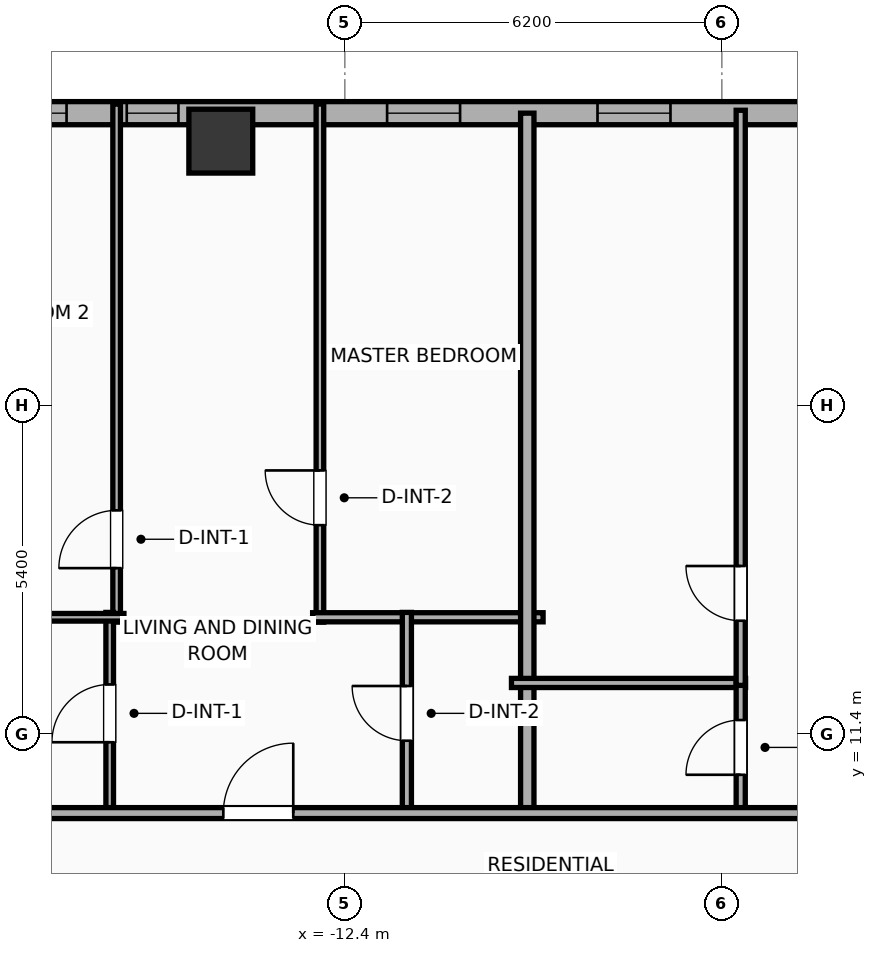
"""IFC4 building model, lengths in metres.
Left out: names, types, materials, properties, quantities, classifications, styles, units other than length and angle.
Written with IfcOpenShell. Run it as: python <this file> out.ifc"""

import sys

from ifc_helpers import new_model, si_unit, direction, frame, frame_2d, origin, origin_2d, place, context, subcontext, project, spatial, rectangle, hollow_rectangle, extrude, element, fill, save


model = new_model("IFC4")
c1 = context("Model", 3, precision=1e-05, world=origin(), true_north=direction((0.0, 1.0)))
c2 = subcontext(c1, "Body", "Model", "MODEL_VIEW")
j1 = project(units=[si_unit("LENGTHUNIT", "METRE"), si_unit("PLANEANGLEUNIT", "RADIAN")], contexts=[c1])
p1 = place(None, origin())
s1 = spatial("IfcSite", under=j1, at=p1, CompositionType="ELEMENT")
p2 = place(p1, origin())
s2 = spatial("IfcBuilding", under=s1, at=p2, CompositionType="ELEMENT")
p3 = place(p2, frame((0.0, 0.0, 105.3)))
s3 = spatial("IfcBuildingStorey", under=s2, at=p3, CompositionType="ELEMENT", Elevation=105.3)
p4 = place(p3, frame((-14.44, 21.15, 0.0), z_axis=(0.0, 0.0, 1.0), x_axis=(1.0, 0.0, 0.0)))
e1 = element("IfcColumn", 1, at=p4, inside=s3, PredefinedType="COLUMN", context=c2, shape_type="SweptSolid", body=[
    extrude(hollow_rectangle(XDim=1.05, YDim=1.05, WallThickness=0.036, at=origin_2d()), origin(), (0.0, 0.0, 1.0), 3.9),
])
p5 = place(p3, frame((-25.381, 21.61, 0.0), z_axis=(0.0, 0.0, 1.0), x_axis=(1.0, 0.0, 0.0)))
e2 = element("IfcWall", 2, at=p5, inside=s3, PredefinedType="ELEMENTEDWALL", context=c2, shape_type="SweptSolid", body=[
    extrude(rectangle(XDim=54.763, YDim=0.38, at=frame_2d((27.381, 0.0))), origin(), (0.0, 0.0, 1.0), 3.65),
])
p6 = place(p5, frame((45.067, 0.0, 0.75)))
e3 = element("IfcOpeningElement", 3, at=p6, cuts=e2, PredefinedType="OPENING", context=c2, shape_type="SweptSolid", body=[
    extrude(rectangle(XDim=2.4, YDim=2.1, at=frame_2d((1.2, 1.05))), frame((0.0, 0.2, 0.0), z_axis=(0.0, -1.0, 0.0), x_axis=(1.0, 0.0, 0.0)), (0.0, 0.0, 1.0), 0.4),
])
p7 = place(p5, frame((4.076, 0.0, 0.75)))
e4 = element("IfcOpeningElement", 4, at=p7, cuts=e2, PredefinedType="OPENING", context=c2, shape_type="SweptSolid", body=[
    extrude(rectangle(XDim=1.2, YDim=2.05, at=frame_2d((0.6, 1.025))), frame((0.0, 0.2, 0.0), z_axis=(0.0, -1.0, 0.0), x_axis=(1.0, 0.0, 0.0)), (0.0, 0.0, 1.0), 0.4),
])
p8 = place(p5, frame((9.395, 0.0, 0.75)))
e5 = element("IfcOpeningElement", 5, at=p8, cuts=e2, PredefinedType="OPENING", context=c2, shape_type="SweptSolid", body=[
    extrude(rectangle(XDim=0.85, YDim=2.05, at=frame_2d((0.425, 1.025))), frame((0.0, 0.2, 0.0), z_axis=(0.0, -1.0, 0.0), x_axis=(1.0, 0.0, 0.0)), (0.0, 0.0, 1.0), 0.4),
])
p9 = place(p5, frame((7.205, 0.0, 0.75)))
e6 = element("IfcOpeningElement", 6, at=p9, cuts=e2, PredefinedType="OPENING", context=c2, shape_type="SweptSolid", body=[
    extrude(rectangle(XDim=1.2, YDim=2.05, at=frame_2d((0.6, 1.025))), frame((0.0, 0.2, 0.0), z_axis=(0.0, -1.0, 0.0), x_axis=(1.0, 0.0, 0.0)), (0.0, 0.0, 1.0), 0.4),
])
p10 = place(p5, frame((13.676, 0.0, 0.75)))
e7 = element("IfcOpeningElement", 7, at=p10, cuts=e2, PredefinedType="OPENING", context=c2, shape_type="SweptSolid", body=[
    extrude(rectangle(XDim=1.2, YDim=2.05, at=frame_2d((0.6, 1.025))), frame((0.0, 0.2, 0.0), z_axis=(0.0, -1.0, 0.0), x_axis=(1.0, 0.0, 0.0)), (0.0, 0.0, 1.0), 0.4),
])
p11 = place(p5, frame((17.136, 0.0, 0.75)))
e8 = element("IfcOpeningElement", 8, at=p11, cuts=e2, PredefinedType="OPENING", context=c2, shape_type="SweptSolid", body=[
    extrude(rectangle(XDim=1.2, YDim=2.05, at=frame_2d((0.6, 1.025))), frame((0.0, 0.2, 0.0), z_axis=(0.0, -1.0, 0.0), x_axis=(1.0, 0.0, 0.0)), (0.0, 0.0, 1.0), 0.4),
])
p12 = place(p5, frame((22.656, 0.0, 0.75)))
e9 = element("IfcOpeningElement", 9, at=p12, cuts=e2, PredefinedType="OPENING", context=c2, shape_type="SweptSolid", body=[
    extrude(rectangle(XDim=1.2, YDim=2.05, at=frame_2d((0.6, 1.025))), frame((0.0, 0.2, 0.0), z_axis=(0.0, -1.0, 0.0), x_axis=(1.0, 0.0, 0.0)), (0.0, 0.0, 1.0), 0.4),
])
p13 = place(p5, frame((29.443, 0.0, 0.75)))
e10 = element("IfcOpeningElement", 10, at=p13, cuts=e2, PredefinedType="OPENING", context=c2, shape_type="SweptSolid", body=[
    extrude(rectangle(XDim=1.2, YDim=2.05, at=frame_2d((0.6, 1.025))), frame((0.0, 0.2, 0.0), z_axis=(0.0, -1.0, 0.0), x_axis=(1.0, 0.0, 0.0)), (0.0, 0.0, 1.0), 0.4),
])
p14 = place(p5, frame((26.348, 0.0, 0.75)))
e11 = element("IfcOpeningElement", 11, at=p14, cuts=e2, PredefinedType="OPENING", context=c2, shape_type="SweptSolid", body=[
    extrude(rectangle(XDim=1.2, YDim=2.05, at=frame_2d((0.6, 1.025))), frame((0.0, 0.2, 0.0), z_axis=(0.0, -1.0, 0.0), x_axis=(1.0, 0.0, 0.0)), (0.0, 0.0, 1.0), 0.4),
])
p15 = place(p5, frame((33.596, 0.0, 0.75)))
e12 = element("IfcOpeningElement", 12, at=p15, cuts=e2, PredefinedType="OPENING", context=c2, shape_type="SweptSolid", body=[
    extrude(rectangle(XDim=1.2, YDim=2.05, at=frame_2d((0.6, 1.025))), frame((0.0, 0.2, 0.0), z_axis=(0.0, -1.0, 0.0), x_axis=(1.0, 0.0, 0.0)), (0.0, 0.0, 1.0), 0.4),
])
p16 = place(p5, frame((36.014, 0.0, 0.75)))
e13 = element("IfcOpeningElement", 13, at=p16, cuts=e2, PredefinedType="OPENING", context=c2, shape_type="SweptSolid", body=[
    extrude(rectangle(XDim=1.2, YDim=2.05, at=frame_2d((0.6, 1.025))), frame((0.0, 0.2, 0.0), z_axis=(0.0, -1.0, 0.0), x_axis=(1.0, 0.0, 0.0)), (0.0, 0.0, 1.0), 0.4),
])
p17 = place(p5, frame((40.814, 0.0, 0.75)))
e14 = element("IfcOpeningElement", 14, at=p17, cuts=e2, PredefinedType="OPENING", context=c2, shape_type="SweptSolid", body=[
    extrude(rectangle(XDim=1.2, YDim=2.05, at=frame_2d((0.6, 1.025))), frame((0.0, 0.2, 0.0), z_axis=(0.0, -1.0, 0.0), x_axis=(1.0, 0.0, 0.0)), (0.0, 0.0, 1.0), 0.4),
])
p18 = place(p5, frame((49.385, 0.0, 0.75)))
e15 = element("IfcOpeningElement", 15, at=p18, cuts=e2, PredefinedType="OPENING", context=c2, shape_type="SweptSolid", body=[
    extrude(rectangle(XDim=1.2, YDim=2.05, at=frame_2d((0.6, 1.025))), frame((0.0, 0.2, 0.0), z_axis=(0.0, -1.0, 0.0), x_axis=(1.0, 0.0, 0.0)), (0.0, 0.0, 1.0), 0.4),
])
p19 = place(p5, frame((52.181, 0.0, 0.75)))
e16 = element("IfcOpeningElement", 16, at=p19, cuts=e2, PredefinedType="OPENING", context=c2, shape_type="SweptSolid", body=[
    extrude(rectangle(XDim=1.2, YDim=2.05, at=frame_2d((0.6, 1.025))), frame((0.0, 0.2, 0.0), z_axis=(0.0, -1.0, 0.0), x_axis=(1.0, 0.0, 0.0)), (0.0, 0.0, 1.0), 0.4),
])
p20 = place(p3, frame((-16.153, 13.24, 0.0), z_axis=(0.0, 0.0, 1.0), x_axis=(0.0, 1.0, 0.0)))
e17 = element("IfcWall", 17, at=p20, inside=s3, PredefinedType="PARTITIONING", context=c2, shape_type="SweptSolid", body=[
    extrude(rectangle(XDim=8.52, YDim=0.125, at=frame_2d((4.26, 0.0))), origin(), (0.0, 0.0, 1.0), 3.65),
])
p21 = place(p20, frame((0.888, 0.0, 0.0)))
e18 = element("IfcOpeningElement", 18, at=p21, cuts=e17, PredefinedType="OPENING", context=c2, shape_type="SweptSolid", body=[
    extrude(rectangle(XDim=0.95, YDim=2.05, at=frame_2d((0.475, 1.025))), frame((0.0, 0.073, 0.0), z_axis=(0.0, -1.0, 0.0), x_axis=(1.0, 0.0, 0.0)), (0.0, 0.0, 1.0), 0.145),
])
p22 = place(p3, frame((-12.81, 13.24, 0.0), z_axis=(0.0, 0.0, 1.0), x_axis=(0.0, 1.0, 0.0)))
e19 = element("IfcWall", 19, at=p22, inside=s3, PredefinedType="PARTITIONING", context=c2, shape_type="SweptSolid", body=[
    extrude(rectangle(XDim=8.52, YDim=0.125, at=frame_2d((4.26, 0.0))), origin(), (0.0, 0.0, 1.0), 3.65),
])
p23 = place(p22, frame((1.595, 0.0, 0.0)))
e20 = element("IfcOpeningElement", 20, at=p23, cuts=e19, PredefinedType="OPENING", context=c2, shape_type="SweptSolid", body=[
    extrude(rectangle(XDim=0.9, YDim=2.05, at=frame_2d((0.45, 1.025))), frame((0.0, 0.073, 0.0), z_axis=(0.0, -1.0, 0.0), x_axis=(1.0, 0.0, 0.0)), (0.0, 0.0, 1.0), 0.145),
])
p24 = place(p3, frame((-12.93, 13.32, 0.0), z_axis=(0.0, 0.0, 1.0), x_axis=(1.0, 0.0, 0.0)))
e21 = element("IfcWall", 21, at=p24, inside=s3, PredefinedType="PLUMBINGWALL", context=c2, shape_type="SweptSolid", body=[
    extrude(rectangle(XDim=3.79, YDim=0.15, at=frame_2d((1.895, 0.0))), origin(), (0.0, 0.0, 1.0), 3.65),
])
p25 = place(p3, frame((-16.267, 10.08, 0.0), z_axis=(0.0, 0.0, 1.0), x_axis=(0.0, 1.0, 0.0)))
e22 = element("IfcWall", 22, at=p25, inside=s3, PredefinedType="PARTITIONING", context=c2, shape_type="SweptSolid", body=[
    extrude(rectangle(XDim=3.32, YDim=0.125, at=frame_2d((1.66, 0.0))), origin(), (0.0, 0.0, 1.0), 3.65),
])
p26 = place(p25, frame((1.185, 0.0, 0.0)))
e23 = element("IfcOpeningElement", 23, at=p26, cuts=e22, PredefinedType="OPENING", context=c2, shape_type="SweptSolid", body=[
    extrude(rectangle(XDim=0.95, YDim=2.05, at=frame_2d((0.475, 1.025))), frame((0.0, 0.073, 0.0), z_axis=(0.0, -1.0, 0.0), x_axis=(1.0, 0.0, 0.0)), (0.0, 0.0, 1.0), 0.145),
])
p27 = place(p3, frame((-19.075, 13.32, 0.0), z_axis=(0.0, 0.0, 1.0), x_axis=(1.0, 0.0, 0.0)))
e24 = element("IfcWall", 24, at=p27, inside=s3, PredefinedType="PARTITIONING", context=c2, shape_type="SweptSolid", body=[
    extrude(rectangle(XDim=3.042, YDim=0.125, at=frame_2d((1.521, 0.0))), origin(), (0.0, 0.0, 1.0), 3.65),
])
p28 = place(p3, frame((-11.38, 10.08, 0.0), z_axis=(0.0, 0.0, 1.0), x_axis=(0.0, 1.0, 0.0)))
e25 = element("IfcWall", 25, at=p28, inside=s3, PredefinedType="PLUMBINGWALL", context=c2, shape_type="SweptSolid", body=[
    extrude(rectangle(XDim=3.32, YDim=0.15, at=frame_2d((1.66, 0.0))), origin(), (0.0, 0.0, 1.0), 3.65),
])
p29 = place(p28, frame((1.21, 0.0, 0.0)))
e26 = element("IfcOpeningElement", 26, at=p29, cuts=e25, PredefinedType="OPENING", context=c2, shape_type="SweptSolid", body=[
    extrude(rectangle(XDim=0.9, YDim=2.05, at=frame_2d((0.45, 1.025))), frame((0.0, 0.085, 0.0), z_axis=(0.0, -1.0, 0.0), x_axis=(1.0, 0.0, 0.0)), (0.0, 0.0, 1.0), 0.17),
])
p30 = place(p3, frame((-9.4, 10.02, 0.0), z_axis=(0.0, 0.0, 1.0), x_axis=(0.0, 1.0, 0.0)))
e27 = element("IfcWall", 27, at=p30, inside=s3, PredefinedType="PARTITIONING", context=c2, shape_type="SweptSolid", body=[
    extrude(rectangle(XDim=11.59, YDim=0.22, at=frame_2d((5.795, 0.0))), origin(), (0.0, 0.0, 1.0), 3.65),
])
p31 = place(p3, frame((-9.66, 12.24, 0.0), z_axis=(0.0, 0.0, 1.0), x_axis=(1.0, 0.0, 0.0)))
e28 = element("IfcWall", 28, at=p31, inside=s3, PredefinedType="PLUMBINGWALL", context=c2, shape_type="SweptSolid", body=[
    extrude(rectangle(XDim=3.85, YDim=0.15, at=frame_2d((1.925, 0.0))), origin(), (0.0, 0.0, 1.0), 3.65),
])
p32 = place(p3, frame((-5.89, 10.08, 0.0), z_axis=(0.0, 0.0, 1.0), x_axis=(0.0, 1.0, 0.0)))
e29 = element("IfcWall", 29, at=p32, inside=s3, PredefinedType="PLUMBINGWALL", context=c2, shape_type="SweptSolid", body=[
    extrude(rectangle(XDim=2.2, YDim=0.15, at=frame_2d((1.1, 0.0))), origin(), (0.0, 0.0, 1.0), 3.65),
])
p33 = place(p32, frame((0.65, 0.0, 0.0)))
e30 = element("IfcOpeningElement", 30, at=p33, cuts=e29, PredefinedType="OPENING", context=c2, shape_type="SweptSolid", body=[
    extrude(rectangle(XDim=0.9, YDim=2.05, at=frame_2d((0.45, 1.025))), frame((0.0, 0.085, 0.0), z_axis=(0.0, -1.0, 0.0), x_axis=(1.0, 0.0, 0.0)), (0.0, 0.0, 1.0), 0.17),
])
p34 = place(p3, frame((-5.89, 12.2, 0.0), z_axis=(0.0, 0.0, 1.0), x_axis=(0.0, 1.0, 0.0)))
e31 = element("IfcWall", 31, at=p34, inside=s3, PredefinedType="PLUMBINGWALL", context=c2, shape_type="SweptSolid", body=[
    extrude(rectangle(XDim=9.458, YDim=0.15, at=frame_2d((4.729, 0.0))), origin(), (0.0, 0.0, 1.0), 3.65),
])
p35 = place(p34, frame((1.063, 0.0, 0.0)))
e32 = element("IfcOpeningElement", 32, at=p35, cuts=e31, PredefinedType="OPENING", context=c2, shape_type="SweptSolid", body=[
    extrude(rectangle(XDim=0.9, YDim=2.05, at=frame_2d((0.45, 1.025))), frame((0.0, 0.085, 0.0), z_axis=(0.0, -1.0, 0.0), x_axis=(1.0, 0.0, 0.0)), (0.0, 0.0, 1.0), 0.17),
])
p36 = place(p3, frame((-29.21, 10.1, 0.0), z_axis=(0.0, 0.0, 1.0), x_axis=(1.0, 0.0, 0.0)))
e33 = element("IfcWall", 33, at=p36, inside=s3, PredefinedType="PARTITIONING", context=c2, shape_type="SweptSolid", body=[
    extrude(rectangle(XDim=62.42, YDim=0.18, at=frame_2d((31.21, 0.0))), origin(), (0.0, 0.0, 1.0), 3.65),
])
p37 = place(p36, frame((4.906, 0.0, 0.0)))
e34 = element("IfcOpeningElement", 34, at=p37, cuts=e33, PredefinedType="OPENING", context=c2, shape_type="SweptSolid", body=[
    extrude(rectangle(XDim=1.15, YDim=2.05, at=frame_2d((0.575, 1.025))), frame((0.0, 0.1, 0.0), z_axis=(0.0, -1.0, 0.0), x_axis=(1.0, 0.0, 0.0)), (0.0, 0.0, 1.0), 0.2),
])
p38 = place(p36, frame((14.812, 0.0, 0.0)))
e35 = element("IfcOpeningElement", 35, at=p38, cuts=e33, PredefinedType="OPENING", context=c2, shape_type="SweptSolid", body=[
    extrude(rectangle(XDim=1.15, YDim=2.05, at=frame_2d((0.575, 1.025))), frame((0.0, 0.1, 0.0), z_axis=(0.0, -1.0, 0.0), x_axis=(1.0, 0.0, 0.0)), (0.0, 0.0, 1.0), 0.2),
])
p39 = place(p36, frame((24.406, 0.0, 0.0)))
e36 = element("IfcOpeningElement", 36, at=p39, cuts=e33, PredefinedType="OPENING", context=c2, shape_type="SweptSolid", body=[
    extrude(rectangle(XDim=1.15, YDim=2.05, at=frame_2d((0.575, 1.025))), frame((0.0, 0.1, 0.0), z_axis=(0.0, -1.0, 0.0), x_axis=(1.0, 0.0, 0.0)), (0.0, 0.0, 1.0), 0.2),
])
p40 = place(p36, frame((33.981, 0.0, 0.0)))
e37 = element("IfcOpeningElement", 37, at=p40, cuts=e33, PredefinedType="OPENING", context=c2, shape_type="SweptSolid", body=[
    extrude(rectangle(XDim=1.15, YDim=2.05, at=frame_2d((0.575, 1.025))), frame((0.0, 0.1, 0.0), z_axis=(0.0, -1.0, 0.0), x_axis=(1.0, 0.0, 0.0)), (0.0, 0.0, 1.0), 0.2),
])
p41 = place(p36, frame((43.138, 0.0, 0.0)))
e38 = element("IfcOpeningElement", 38, at=p41, cuts=e33, PredefinedType="OPENING", context=c2, shape_type="SweptSolid", body=[
    extrude(rectangle(XDim=1.15, YDim=2.05, at=frame_2d((0.575, 1.025))), frame((0.0, 0.1, 0.0), z_axis=(0.0, -1.0, 0.0), x_axis=(1.0, 0.0, 0.0)), (0.0, 0.0, 1.0), 0.2),
])
p42 = place(p36, frame((51.777, 0.0, 0.0)))
e39 = element("IfcOpeningElement", 39, at=p42, cuts=e33, PredefinedType="OPENING", context=c2, shape_type="SweptSolid", body=[
    extrude(rectangle(XDim=0.9, YDim=2.05, at=frame_2d((0.45, 1.025))), frame((0.0, 0.1, 0.0), z_axis=(0.0, -1.0, 0.0), x_axis=(1.0, 0.0, 0.0)), (0.0, 0.0, 1.0), 0.2),
])
p43 = place(p36, frame((58.718, 0.0, 0.0)))
e40 = element("IfcOpeningElement", 40, at=p43, cuts=e33, PredefinedType="OPENING", context=c2, shape_type="SweptSolid", body=[
    extrude(rectangle(XDim=0.9, YDim=2.05, at=frame_2d((0.45, 1.025))), frame((0.0, 0.1, 0.0), z_axis=(0.0, -1.0, 0.0), x_axis=(1.0, 0.0, 0.0)), (0.0, 0.0, 1.0), 0.2),
])
p44 = place(p8, origin())
e41 = element("IfcWindow", 41, at=p44, inside=s3, PartitioningType="SINGLE_PANEL", PredefinedType="WINDOW", context=c2, shape_type="SweptSolid", body=[
    extrude(rectangle(XDim=0.85, YDim=2.05, at=frame_2d((0.425, 1.025))), frame((0.0, 0.03, 0.0), z_axis=(0.0, -1.0, 0.0), x_axis=(1.0, 0.0, 0.0)), (0.0, 0.0, 1.0), 0.06),
])
fill(e5, e41)
p45 = place(p9, origin())
e42 = element("IfcWindow", 42, at=p45, inside=s3, PartitioningType="SINGLE_PANEL", PredefinedType="WINDOW", context=c2, shape_type="SweptSolid", body=[
    extrude(rectangle(XDim=1.2, YDim=2.05, at=frame_2d((0.6, 1.025))), frame((0.0, 0.03, 0.0), z_axis=(0.0, -1.0, 0.0), x_axis=(1.0, 0.0, 0.0)), (0.0, 0.0, 1.0), 0.06),
])
fill(e6, e42)
p46 = place(p10, origin())
e43 = element("IfcWindow", 43, at=p46, inside=s3, PartitioningType="SINGLE_PANEL", PredefinedType="WINDOW", context=c2, shape_type="SweptSolid", body=[
    extrude(rectangle(XDim=1.2, YDim=2.05, at=frame_2d((0.6, 1.025))), frame((0.0, 0.03, 0.0), z_axis=(0.0, -1.0, 0.0), x_axis=(1.0, 0.0, 0.0)), (0.0, 0.0, 1.0), 0.06),
])
fill(e7, e43)
p47 = place(p11, origin())
e44 = element("IfcWindow", 44, at=p47, inside=s3, PartitioningType="SINGLE_PANEL", PredefinedType="WINDOW", context=c2, shape_type="SweptSolid", body=[
    extrude(rectangle(XDim=1.2, YDim=2.05, at=frame_2d((0.6, 1.025))), frame((0.0, 0.03, 0.0), z_axis=(0.0, -1.0, 0.0), x_axis=(1.0, 0.0, 0.0)), (0.0, 0.0, 1.0), 0.06),
])
fill(e8, e44)
p48 = place(p21, origin())
e45 = element("IfcDoor", 45, at=p48, inside=s3, OperationType="SINGLE_SWING_LEFT", PredefinedType="DOOR", context=c2, shape_type="SweptSolid", body=[
    extrude(rectangle(XDim=0.95, YDim=2.05, at=frame_2d((0.475, 1.025))), frame((0.0, 0.025, 0.0), z_axis=(0.0, -1.0, 0.0), x_axis=(1.0, 0.0, 0.0)), (0.0, 0.0, 1.0), 0.05),
])
fill(e18, e45)
p49 = place(p23, origin())
e46 = element("IfcDoor", 46, at=p49, inside=s3, OperationType="SINGLE_SWING_RIGHT", PredefinedType="DOOR", context=c2, shape_type="SweptSolid", body=[
    extrude(rectangle(XDim=0.9, YDim=2.05, at=frame_2d((0.45, 1.025))), frame((0.0, 0.025, 0.0), z_axis=(0.0, -1.0, 0.0), x_axis=(1.0, 0.0, 0.0)), (0.0, 0.0, 1.0), 0.05),
])
fill(e20, e46)
p50 = place(p26, origin())
e47 = element("IfcDoor", 47, at=p50, inside=s3, OperationType="SINGLE_SWING_LEFT", PredefinedType="DOOR", context=c2, shape_type="SweptSolid", body=[
    extrude(rectangle(XDim=0.95, YDim=2.05, at=frame_2d((0.475, 1.025))), frame((0.0, 0.025, 0.0), z_axis=(0.0, -1.0, 0.0), x_axis=(1.0, 0.0, 0.0)), (0.0, 0.0, 1.0), 0.05),
])
fill(e23, e47)
p51 = place(p29, origin())
e48 = element("IfcDoor", 48, at=p51, inside=s3, OperationType="SINGLE_SWING_RIGHT", PredefinedType="DOOR", context=c2, shape_type="SweptSolid", body=[
    extrude(rectangle(XDim=0.9, YDim=2.05, at=frame_2d((0.45, 1.025))), frame((0.0, 0.025, 0.0), z_axis=(0.0, -1.0, 0.0), x_axis=(1.0, 0.0, 0.0)), (0.0, 0.0, 1.0), 0.05),
])
fill(e26, e48)
p52 = place(p33, origin())
e49 = element("IfcDoor", 49, at=p52, inside=s3, OperationType="SINGLE_SWING_LEFT", PredefinedType="DOOR", context=c2, shape_type="SweptSolid", body=[
    extrude(rectangle(XDim=0.9, YDim=2.05, at=frame_2d((0.45, 1.025))), frame((0.0, 0.025, 0.0), z_axis=(0.0, -1.0, 0.0), x_axis=(1.0, 0.0, 0.0)), (0.0, 0.0, 1.0), 0.05),
])
fill(e30, e49)
p53 = place(p35, origin())
e50 = element("IfcDoor", 50, at=p53, inside=s3, OperationType="SINGLE_SWING_RIGHT", PredefinedType="DOOR", context=c2, shape_type="SweptSolid", body=[
    extrude(rectangle(XDim=0.9, YDim=2.05, at=frame_2d((0.45, 1.025))), frame((0.0, 0.025, 0.0), z_axis=(0.0, -1.0, 0.0), x_axis=(1.0, 0.0, 0.0)), (0.0, 0.0, 1.0), 0.05),
])
fill(e32, e50)
p54 = place(p38, origin())
e51 = element("IfcDoor", 51, at=p54, inside=s3, OperationType="SINGLE_SWING_RIGHT", PredefinedType="DOOR", context=c2, shape_type="SweptSolid", body=[
    extrude(rectangle(XDim=1.15, YDim=2.05, at=frame_2d((0.575, 1.025))), frame((0.0, 0.025, 0.0), z_axis=(0.0, -1.0, 0.0), x_axis=(1.0, 0.0, 0.0)), (0.0, 0.0, 1.0), 0.05),
])
fill(e35, e51)
save(model, sys.argv[1])
